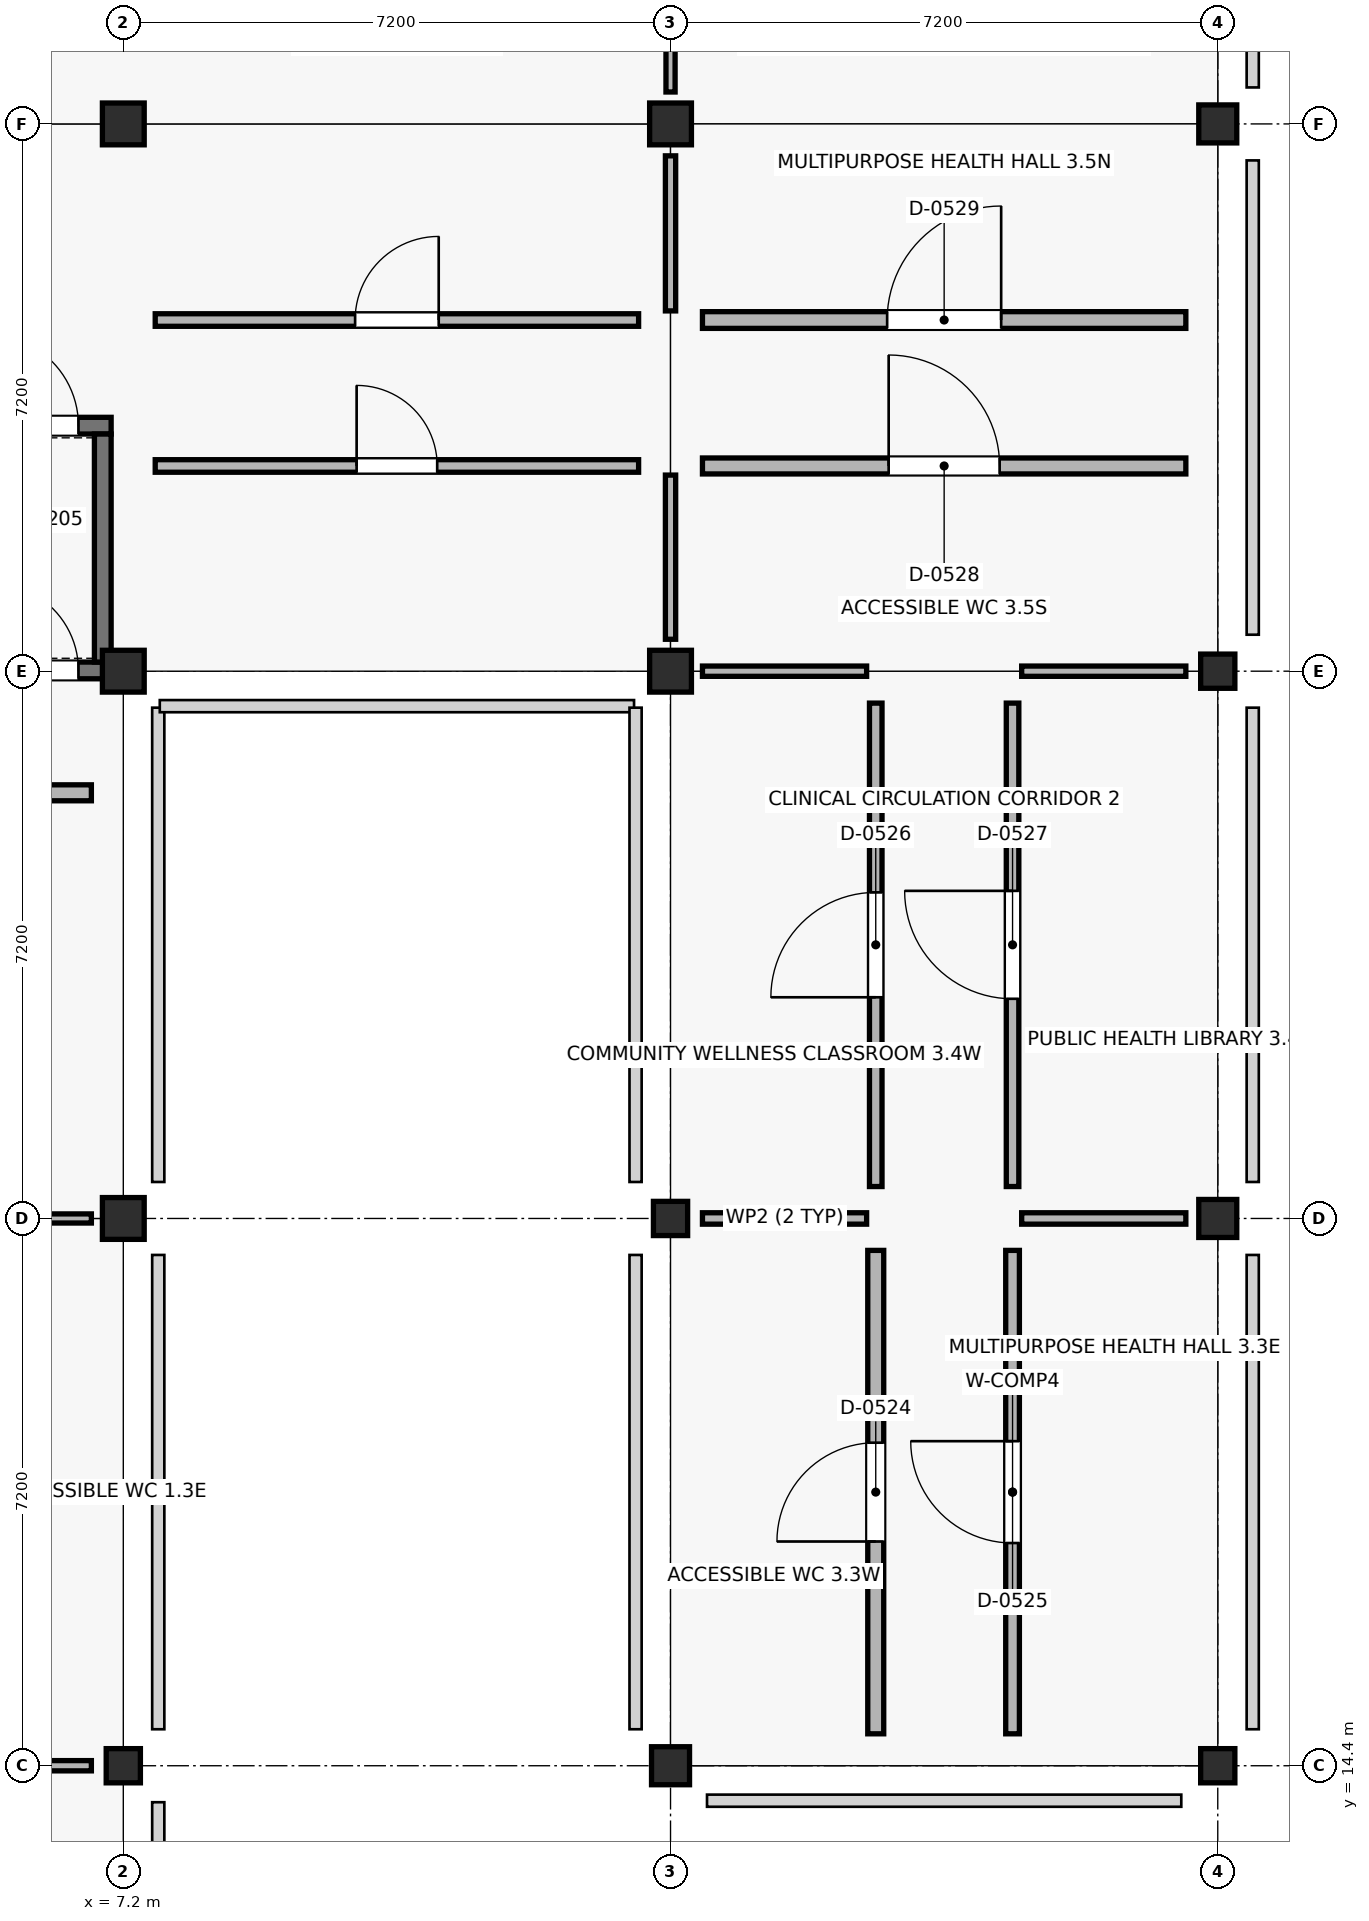
"""IFC4 building model, lengths in metres.
Left out: names, types, materials, properties, quantities, classifications, styles, units other than length and angle.
Written with IfcOpenShell. Run it as: python <this file> out.ifc"""

import sys

from ifc_helpers import new_model, si_unit, direction, frame, frame_2d, origin, origin_2d, place, context, subcontext, project, spatial, rectangle, extrude, element, fill, save


model = new_model("IFC4")
c1 = context("Model", 3, precision=1e-05, world=origin(), true_north=direction((0.0, 1.0)))
c2 = subcontext(c1, "Body", "Model", "MODEL_VIEW")
j1 = project(units=[si_unit("LENGTHUNIT", "METRE"), si_unit("PLANEANGLEUNIT", "RADIAN")], contexts=[c1])
p1 = place(None, origin())
s1 = spatial("IfcSite", under=j1, at=p1, CompositionType="ELEMENT")
p2 = place(p1, origin())
s2 = spatial("IfcBuilding", under=s1, at=p2, CompositionType="ELEMENT")
p3 = place(p2, frame((0.0, 0.0, 9.0)))
s3 = spatial("IfcBuildingStorey", under=s2, at=p3, CompositionType="ELEMENT", Elevation=9.0)
p4 = place(p3, frame((7.2, 14.4, 0.0), z_axis=(0.0, 0.0, 1.0), x_axis=(1.0, 0.0, 0.0)))
e1 = element("IfcColumn", 1, at=p4, inside=s3, PredefinedType="COLUMN", context=c2, shape_type="SweptSolid", body=[
    extrude(rectangle(XDim=0.45, YDim=0.45, at=origin_2d()), origin(), (0.0, 0.0, 1.0), 4.28),
])
for number, where, z_axis, x_axis in (
    (2, (7.2, 21.6, 0.0), (0.0, 0.0, 1.0), (1.0, 0.0, 0.0)),
    (3, (7.2, 28.8, 0.0), (0.0, 0.0, 1.0), (1.0, 0.0, 0.0)),
    (4, (7.2, 36.0, 0.0), (0.0, 0.0, 1.0), (1.0, 0.0, 0.0)),
):
    element("IfcColumn", number, at=place(p3, frame(where, z_axis=z_axis, x_axis=x_axis)), inside=s3, PredefinedType="COLUMN", context=c2, shape_type="SweptSolid", body=[
        extrude(rectangle(XDim=0.55, YDim=0.55, at=origin_2d()), origin(), (0.0, 0.0, 1.0), 4.5),
    ])
p5 = place(p3, frame((14.4, 14.4, 0.0), z_axis=(0.0, 0.0, 1.0), x_axis=(1.0, 0.0, 0.0)))
e5 = element("IfcColumn", 5, at=p5, inside=s3, PredefinedType="COLUMN", context=c2, shape_type="SweptSolid", body=[
    extrude(rectangle(XDim=0.5, YDim=0.5, at=origin_2d()), origin(), (0.0, 0.0, 1.0), 4.28),
])
p6 = place(p3, frame((14.4, 21.6, 0.0), z_axis=(0.0, 0.0, 1.0), x_axis=(1.0, 0.0, 0.0)))
e6 = element("IfcColumn", 6, at=p6, inside=s3, PredefinedType="COLUMN", context=c2, shape_type="SweptSolid", body=[
    extrude(rectangle(XDim=0.45, YDim=0.45, at=origin_2d()), origin(), (0.0, 0.0, 1.0), 4.28),
])
for number, where, z_axis, x_axis in (
    (7, (14.4, 28.8, 0.0), (0.0, 0.0, 1.0), (1.0, 0.0, 0.0)),
    (8, (14.4, 36.0, 0.0), (0.0, 0.0, 1.0), (1.0, 0.0, 0.0)),
):
    element("IfcColumn", number, at=place(p3, frame(where, z_axis=z_axis, x_axis=x_axis)), inside=s3, PredefinedType="COLUMN", context=c2, shape_type="SweptSolid", body=[
        extrude(rectangle(XDim=0.55, YDim=0.55, at=origin_2d()), origin(), (0.0, 0.0, 1.0), 4.5),
    ])
p7 = place(p3, frame((21.6, 14.4, 0.0), z_axis=(0.0, 0.0, 1.0), x_axis=(1.0, 0.0, 0.0)))
e9 = element("IfcColumn", 9, at=p7, inside=s3, PredefinedType="COLUMN", context=c2, shape_type="SweptSolid", body=[
    extrude(rectangle(XDim=0.45, YDim=0.45, at=origin_2d()), origin(), (0.0, 0.0, 1.0), 4.28),
])
p8 = place(p3, frame((21.6, 21.6, 0.0), z_axis=(0.0, 0.0, 1.0), x_axis=(1.0, 0.0, 0.0)))
e10 = element("IfcColumn", 10, at=p8, inside=s3, PredefinedType="COLUMN", context=c2, shape_type="SweptSolid", body=[
    extrude(rectangle(XDim=0.5, YDim=0.5, at=origin_2d()), origin(), (0.0, 0.0, 1.0), 4.28),
])
p9 = place(p3, frame((21.6, 28.8, 0.0), z_axis=(0.0, 0.0, 1.0), x_axis=(1.0, 0.0, 0.0)))
e11 = element("IfcColumn", 11, at=p9, inside=s3, PredefinedType="COLUMN", context=c2, shape_type="SweptSolid", body=[
    extrude(rectangle(XDim=0.45, YDim=0.45, at=origin_2d()), origin(), (0.0, 0.0, 1.0), 4.28),
])
p10 = place(p3, frame((21.6, 36.0, 0.0), z_axis=(0.0, 0.0, 1.0), x_axis=(1.0, 0.0, 0.0)))
e12 = element("IfcColumn", 12, at=p10, inside=s3, PredefinedType="COLUMN", context=c2, shape_type="SweptSolid", body=[
    extrude(rectangle(XDim=0.5, YDim=0.5, at=origin_2d()), origin(), (0.0, 0.0, 1.0), 4.28),
])
p11 = place(p3, frame((0.16, 28.81, 0.0), z_axis=(0.0, 0.0, 1.0), x_axis=(1.0, 0.0, 0.0)))
e13 = element("IfcWall", 13, at=p11, inside=s3, PredefinedType="SHEAR", context=c2, shape_type="SweptSolid", body=[
    extrude(rectangle(XDim=6.88, YDim=0.22, at=frame_2d((3.44, 0.0))), origin(), (0.0, 0.0, 1.0), 4.24),
])
p12 = place(p11, frame((5.3, 0.0, 0.0)))
e14 = element("IfcOpeningElement", 14, at=p12, cuts=e13, PredefinedType="OPENING", context=c2, shape_type="SweptSolid", body=[
    extrude(rectangle(XDim=1.15, YDim=2.15, at=frame_2d((0.575, 1.075))), frame((0.0, 0.12, 0.0), z_axis=(0.0, -1.0, 0.0), x_axis=(1.0, 0.0, 0.0)), (0.0, 0.0, 1.0), 0.24),
])
p13 = place(p3, frame((0.16, 32.03, 0.0), z_axis=(0.0, 0.0, 1.0), x_axis=(1.0, 0.0, 0.0)))
e15 = element("IfcWall", 15, at=p13, inside=s3, PredefinedType="SHEAR", context=c2, shape_type="SweptSolid", body=[
    extrude(rectangle(XDim=6.88, YDim=0.22, at=frame_2d((3.44, 0.0))), origin(), (0.0, 0.0, 1.0), 4.24),
])
p14 = place(p13, frame((5.25, 0.0, 0.0)))
e16 = element("IfcOpeningElement", 16, at=p14, cuts=e15, PredefinedType="OPENING", context=c2, shape_type="SweptSolid", body=[
    extrude(rectangle(XDim=1.2, YDim=2.15, at=frame_2d((0.6, 1.075))), frame((0.0, 0.12, 0.0), z_axis=(0.0, -1.0, 0.0), x_axis=(1.0, 0.0, 0.0)), (0.0, 0.0, 1.0), 0.24),
])
p15 = place(p3, frame((6.93, 28.92, 0.0), z_axis=(0.0, 0.0, 1.0), x_axis=(0.0, 1.0, 0.0)))
e17 = element("IfcWall", 17, at=p15, inside=s3, PredefinedType="SHEAR", context=c2, shape_type="SweptSolid", body=[
    extrude(rectangle(XDim=3.0, YDim=0.22, at=frame_2d((1.5, 0.0))), origin(), (0.0, 0.0, 1.0), 4.24),
])
p16 = place(p3, frame((4.62, 14.4, 0.0), z_axis=(0.0, 0.0, 1.0), x_axis=(1.0, 0.0, 0.0)))
e18 = element("IfcWall", 18, at=p16, inside=s3, PredefinedType="PARTITIONING", context=c2, shape_type="SweptSolid", body=[
    extrude(rectangle(XDim=2.16, YDim=0.135, at=frame_2d((1.08, 0.0))), origin(), (0.0, 0.0, 1.0), 3.38),
])
p17 = place(p3, frame((4.62, 21.6, 0.0), z_axis=(0.0, 0.0, 1.0), x_axis=(1.0, 0.0, 0.0)))
e19 = element("IfcWall", 19, at=p17, inside=s3, PredefinedType="PARTITIONING", context=c2, shape_type="SweptSolid", body=[
    extrude(rectangle(XDim=2.16, YDim=0.12, at=frame_2d((1.08, 0.0))), origin(), (0.0, 0.0, 1.0), 3.38),
])
p18 = place(p3, frame((4.5, 27.2, 0.0), z_axis=(0.0, 0.0, 1.0), x_axis=(1.0, 0.0, 0.0)))
e20 = element("IfcWall", 20, at=p18, inside=s3, PredefinedType="PLUMBINGWALL", context=c2, shape_type="SweptSolid", body=[
    extrude(rectangle(XDim=2.28, YDim=0.21, at=frame_2d((1.14, 0.0))), origin(), (0.0, 0.0, 1.0), 3.38),
])
p19 = place(p3, frame((7.62, 31.5, 0.0), z_axis=(0.0, 0.0, 1.0), x_axis=(1.0, 0.0, 0.0)))
e21 = element("IfcWall", 21, at=p19, inside=s3, PredefinedType="PARTITIONING", context=c2, shape_type="SweptSolid", body=[
    extrude(rectangle(XDim=6.36, YDim=0.165, at=frame_2d((3.18, 0.0))), origin(), (0.0, 0.0, 1.0), 3.38),
])
p20 = place(p19, frame((2.65, 0.0, 0.0)))
e22 = element("IfcOpeningElement", 22, at=p20, cuts=e21, PredefinedType="OPENING", context=c2, shape_type="SweptSolid", body=[
    extrude(rectangle(XDim=1.06, YDim=2.09, at=frame_2d((0.53, 1.045))), frame((0.0, 0.093, 0.0), z_axis=(0.0, -1.0, 0.0), x_axis=(1.0, 0.0, 0.0)), (0.0, 0.0, 1.0), 0.185),
])
p21 = place(p3, frame((14.4, 29.22, 0.0), z_axis=(0.0, 0.0, 1.0), x_axis=(0.0, 1.0, 0.0)))
e23 = element("IfcWall", 23, at=p21, inside=s3, PredefinedType="PARTITIONING", context=c2, shape_type="SweptSolid", body=[
    extrude(rectangle(XDim=2.16, YDim=0.135, at=frame_2d((1.08, 0.0))), origin(), (0.0, 0.0, 1.0), 3.38),
])
p22 = place(p3, frame((7.62, 33.42, 0.0), z_axis=(0.0, 0.0, 1.0), x_axis=(1.0, 0.0, 0.0)))
e24 = element("IfcWall", 24, at=p22, inside=s3, PredefinedType="PARTITIONING", context=c2, shape_type="SweptSolid", body=[
    extrude(rectangle(XDim=6.36, YDim=0.165, at=frame_2d((3.18, 0.0))), origin(), (0.0, 0.0, 1.0), 3.38),
])
p23 = place(p22, frame((2.63, 0.0, 0.0)))
e25 = element("IfcOpeningElement", 25, at=p23, cuts=e24, PredefinedType="OPENING", context=c2, shape_type="SweptSolid", body=[
    extrude(rectangle(XDim=1.1, YDim=2.09, at=frame_2d((0.55, 1.045))), frame((0.0, 0.093, 0.0), z_axis=(0.0, -1.0, 0.0), x_axis=(1.0, 0.0, 0.0)), (0.0, 0.0, 1.0), 0.185),
])
p24 = place(p3, frame((14.4, 33.54, 0.0), z_axis=(0.0, 0.0, 1.0), x_axis=(0.0, 1.0, 0.0)))
e26 = element("IfcWall", 26, at=p24, inside=s3, PredefinedType="PARTITIONING", context=c2, shape_type="SweptSolid", body=[
    extrude(rectangle(XDim=2.04, YDim=0.135, at=frame_2d((1.02, 0.0))), origin(), (0.0, 0.0, 1.0), 3.38),
])
p25 = place(p3, frame((14.4, 36.42, 0.0), z_axis=(0.0, 0.0, 1.0), x_axis=(0.0, 1.0, 0.0)))
e27 = element("IfcWall", 27, at=p25, inside=s3, PredefinedType="PARTITIONING", context=c2, shape_type="SweptSolid", body=[
    extrude(rectangle(XDim=2.16, YDim=0.12, at=frame_2d((1.08, 0.0))), origin(), (0.0, 0.0, 1.0), 3.38),
])
p26 = place(p3, frame((17.1, 14.82, 0.0), z_axis=(0.0, 0.0, 1.0), x_axis=(0.0, 1.0, 0.0)))
e28 = element("IfcWall", 28, at=p26, inside=s3, PredefinedType="PLUMBINGWALL", context=c2, shape_type="SweptSolid", body=[
    extrude(rectangle(XDim=6.36, YDim=0.21, at=frame_2d((3.18, 0.0))), origin(), (0.0, 0.0, 1.0), 3.38),
])
p27 = place(p26, frame((2.53, 0.0, 0.0)))
e29 = element("IfcOpeningElement", 29, at=p27, cuts=e28, PredefinedType="OPENING", context=c2, shape_type="SweptSolid", body=[
    extrude(rectangle(XDim=1.3, YDim=2.09, at=frame_2d((0.65, 1.045))), frame((0.0, 0.115, 0.0), z_axis=(0.0, -1.0, 0.0), x_axis=(1.0, 0.0, 0.0)), (0.0, 0.0, 1.0), 0.23),
])
p28 = place(p3, frame((14.82, 21.6, 0.0), z_axis=(0.0, 0.0, 1.0), x_axis=(1.0, 0.0, 0.0)))
e30 = element("IfcWall", 30, at=p28, inside=s3, PredefinedType="PARTITIONING", context=c2, shape_type="SweptSolid", body=[
    extrude(rectangle(XDim=2.16, YDim=0.15, at=frame_2d((1.08, 0.0))), origin(), (0.0, 0.0, 1.0), 3.38),
])
p29 = place(p3, frame((18.9, 14.82, 0.0), z_axis=(0.0, 0.0, 1.0), x_axis=(0.0, 1.0, 0.0)))
e31 = element("IfcWall", 31, at=p29, inside=s3, PredefinedType="PARTITIONING", context=c2, shape_type="SweptSolid", body=[
    extrude(rectangle(XDim=6.36, YDim=0.18, at=frame_2d((3.18, 0.0))), origin(), (0.0, 0.0, 1.0), 3.38),
])
p30 = place(p29, frame((2.51, 0.0, 0.0)))
e32 = element("IfcOpeningElement", 32, at=p30, cuts=e31, PredefinedType="OPENING", context=c2, shape_type="SweptSolid", body=[
    extrude(rectangle(XDim=1.34, YDim=2.09, at=frame_2d((0.67, 1.045))), frame((0.0, 0.1, 0.0), z_axis=(0.0, -1.0, 0.0), x_axis=(1.0, 0.0, 0.0)), (0.0, 0.0, 1.0), 0.2),
])
p31 = place(p3, frame((19.02, 21.6, 0.0), z_axis=(0.0, 0.0, 1.0), x_axis=(1.0, 0.0, 0.0)))
e33 = element("IfcWall", 33, at=p31, inside=s3, PredefinedType="PARTITIONING", context=c2, shape_type="SweptSolid", body=[
    extrude(rectangle(XDim=2.16, YDim=0.15, at=frame_2d((1.08, 0.0))), origin(), (0.0, 0.0, 1.0), 3.38),
])
p32 = place(p3, frame((17.1, 22.02, 0.0), z_axis=(0.0, 0.0, 1.0), x_axis=(0.0, 1.0, 0.0)))
e34 = element("IfcWall", 34, at=p32, inside=s3, PredefinedType="PARTITIONING", context=c2, shape_type="SweptSolid", body=[
    extrude(rectangle(XDim=6.36, YDim=0.165, at=frame_2d((3.18, 0.0))), origin(), (0.0, 0.0, 1.0), 3.38),
])
p33 = place(p32, frame((2.49, 0.0, 0.0)))
e35 = element("IfcOpeningElement", 35, at=p33, cuts=e34, PredefinedType="OPENING", context=c2, shape_type="SweptSolid", body=[
    extrude(rectangle(XDim=1.38, YDim=2.09, at=frame_2d((0.69, 1.045))), frame((0.0, 0.093, 0.0), z_axis=(0.0, -1.0, 0.0), x_axis=(1.0, 0.0, 0.0)), (0.0, 0.0, 1.0), 0.185),
])
p34 = place(p3, frame((14.82, 28.8, 0.0), z_axis=(0.0, 0.0, 1.0), x_axis=(1.0, 0.0, 0.0)))
e36 = element("IfcWall", 36, at=p34, inside=s3, PredefinedType="PARTITIONING", context=c2, shape_type="SweptSolid", body=[
    extrude(rectangle(XDim=2.16, YDim=0.135, at=frame_2d((1.08, 0.0))), origin(), (0.0, 0.0, 1.0), 3.38),
])
p35 = place(p3, frame((18.9, 22.02, 0.0), z_axis=(0.0, 0.0, 1.0), x_axis=(0.0, 1.0, 0.0)))
e37 = element("IfcWall", 37, at=p35, inside=s3, PredefinedType="PARTITIONING", context=c2, shape_type="SweptSolid", body=[
    extrude(rectangle(XDim=6.36, YDim=0.165, at=frame_2d((3.18, 0.0))), origin(), (0.0, 0.0, 1.0), 3.38),
])
p36 = place(p35, frame((2.47, 0.0, 0.0)))
e38 = element("IfcOpeningElement", 38, at=p36, cuts=e37, PredefinedType="OPENING", context=c2, shape_type="SweptSolid", body=[
    extrude(rectangle(XDim=1.42, YDim=2.09, at=frame_2d((0.71, 1.045))), frame((0.0, 0.093, 0.0), z_axis=(0.0, -1.0, 0.0), x_axis=(1.0, 0.0, 0.0)), (0.0, 0.0, 1.0), 0.185),
])
p37 = place(p3, frame((19.02, 28.8, 0.0), z_axis=(0.0, 0.0, 1.0), x_axis=(1.0, 0.0, 0.0)))
e39 = element("IfcWall", 39, at=p37, inside=s3, PredefinedType="PARTITIONING", context=c2, shape_type="SweptSolid", body=[
    extrude(rectangle(XDim=2.16, YDim=0.135, at=frame_2d((1.08, 0.0))), origin(), (0.0, 0.0, 1.0), 3.38),
])
p38 = place(p3, frame((14.82, 31.5, 0.0), z_axis=(0.0, 0.0, 1.0), x_axis=(1.0, 0.0, 0.0)))
e40 = element("IfcWall", 40, at=p38, inside=s3, PredefinedType="PLUMBINGWALL", context=c2, shape_type="SweptSolid", body=[
    extrude(rectangle(XDim=6.36, YDim=0.21, at=frame_2d((3.18, 0.0))), origin(), (0.0, 0.0, 1.0), 3.38),
])
p39 = place(p38, frame((2.45, 0.0, 0.0)))
e41 = element("IfcOpeningElement", 41, at=p39, cuts=e40, PredefinedType="OPENING", context=c2, shape_type="SweptSolid", body=[
    extrude(rectangle(XDim=1.46, YDim=2.09, at=frame_2d((0.73, 1.045))), frame((0.0, 0.115, 0.0), z_axis=(0.0, -1.0, 0.0), x_axis=(1.0, 0.0, 0.0)), (0.0, 0.0, 1.0), 0.23),
])
p40 = place(p3, frame((14.82, 33.42, 0.0), z_axis=(0.0, 0.0, 1.0), x_axis=(1.0, 0.0, 0.0)))
e42 = element("IfcWall", 42, at=p40, inside=s3, PredefinedType="SOLIDWALL", context=c2, shape_type="SweptSolid", body=[
    extrude(rectangle(XDim=6.36, YDim=0.22, at=frame_2d((3.18, 0.0))), origin(), (0.0, 0.0, 1.0), 3.38),
])
p41 = place(p40, frame((2.43, 0.0, 0.0)))
e43 = element("IfcOpeningElement", 43, at=p41, cuts=e42, PredefinedType="OPENING", context=c2, shape_type="SweptSolid", body=[
    extrude(rectangle(XDim=1.5, YDim=2.09, at=frame_2d((0.75, 1.045))), frame((0.0, 0.12, 0.0), z_axis=(0.0, -1.0, 0.0), x_axis=(1.0, 0.0, 0.0)), (0.0, 0.0, 1.0), 0.24),
])
p42 = place(p14, origin())
e44 = element("IfcDoor", 44, at=p42, inside=s3, OperationType="SINGLE_SWING_LEFT", PredefinedType="DOOR", context=c2, shape_type="SweptSolid", body=[
    extrude(rectangle(XDim=1.2, YDim=2.15, at=frame_2d((0.6, 1.075))), frame((0.0, 0.025, 0.0), z_axis=(0.0, -1.0, 0.0), x_axis=(1.0, 0.0, 0.0)), (0.0, 0.0, 1.0), 0.05),
])
fill(e16, e44)
p43 = place(p12, origin())
e45 = element("IfcDoor", 45, at=p43, inside=s3, OperationType="SINGLE_SWING_LEFT", PredefinedType="DOOR", context=c2, shape_type="SweptSolid", body=[
    extrude(rectangle(XDim=1.15, YDim=2.15, at=frame_2d((0.575, 1.075))), frame((0.0, 0.025, 0.0), z_axis=(0.0, -1.0, 0.0), x_axis=(1.0, 0.0, 0.0)), (0.0, 0.0, 1.0), 0.05),
])
fill(e14, e45)
p44 = place(p20, origin())
e46 = element("IfcDoor", 46, at=p44, inside=s3, OperationType="SINGLE_SWING_LEFT", PredefinedType="DOOR", context=c2, shape_type="SweptSolid", body=[
    extrude(rectangle(XDim=1.06, YDim=2.09, at=frame_2d((0.53, 1.045))), frame((0.0, 0.025, 0.0), z_axis=(0.0, -1.0, 0.0), x_axis=(1.0, 0.0, 0.0)), (0.0, 0.0, 1.0), 0.05),
])
fill(e22, e46)
p45 = place(p23, origin())
e47 = element("IfcDoor", 47, at=p45, inside=s3, OperationType="SINGLE_SWING_RIGHT", PredefinedType="DOOR", context=c2, shape_type="SweptSolid", body=[
    extrude(rectangle(XDim=1.1, YDim=2.09, at=frame_2d((0.55, 1.045))), frame((0.0, 0.025, 0.0), z_axis=(0.0, -1.0, 0.0), x_axis=(1.0, 0.0, 0.0)), (0.0, 0.0, 1.0), 0.05),
])
fill(e25, e47)
p46 = place(p27, origin())
e48 = element("IfcDoor", 48, at=p46, inside=s3, OperationType="SINGLE_SWING_LEFT", PredefinedType="DOOR", context=c2, shape_type="SweptSolid", body=[
    extrude(rectangle(XDim=1.3, YDim=2.09, at=frame_2d((0.65, 1.045))), frame((0.0, 0.025, 0.0), z_axis=(0.0, -1.0, 0.0), x_axis=(1.0, 0.0, 0.0)), (0.0, 0.0, 1.0), 0.05),
])
fill(e29, e48)
p47 = place(p30, origin())
e49 = element("IfcDoor", 49, at=p47, inside=s3, OperationType="SINGLE_SWING_RIGHT", PredefinedType="DOOR", context=c2, shape_type="SweptSolid", body=[
    extrude(rectangle(XDim=1.34, YDim=2.09, at=frame_2d((0.67, 1.045))), frame((0.0, 0.025, 0.0), z_axis=(0.0, -1.0, 0.0), x_axis=(1.0, 0.0, 0.0)), (0.0, 0.0, 1.0), 0.05),
])
fill(e32, e49)
p48 = place(p33, origin())
e50 = element("IfcDoor", 50, at=p48, inside=s3, OperationType="SINGLE_SWING_LEFT", PredefinedType="DOOR", context=c2, shape_type="SweptSolid", body=[
    extrude(rectangle(XDim=1.38, YDim=2.09, at=frame_2d((0.69, 1.045))), frame((0.0, 0.025, 0.0), z_axis=(0.0, -1.0, 0.0), x_axis=(1.0, 0.0, 0.0)), (0.0, 0.0, 1.0), 0.05),
])
fill(e35, e50)
p49 = place(p36, origin())
e51 = element("IfcDoor", 51, at=p49, inside=s3, OperationType="SINGLE_SWING_RIGHT", PredefinedType="DOOR", context=c2, shape_type="SweptSolid", body=[
    extrude(rectangle(XDim=1.42, YDim=2.09, at=frame_2d((0.71, 1.045))), frame((0.0, 0.025, 0.0), z_axis=(0.0, -1.0, 0.0), x_axis=(1.0, 0.0, 0.0)), (0.0, 0.0, 1.0), 0.05),
])
fill(e38, e51)
p50 = place(p39, origin())
e52 = element("IfcDoor", 52, at=p50, inside=s3, OperationType="SINGLE_SWING_LEFT", PredefinedType="DOOR", context=c2, shape_type="SweptSolid", body=[
    extrude(rectangle(XDim=1.46, YDim=2.09, at=frame_2d((0.73, 1.045))), frame((0.0, 0.025, 0.0), z_axis=(0.0, -1.0, 0.0), x_axis=(1.0, 0.0, 0.0)), (0.0, 0.0, 1.0), 0.05),
])
fill(e41, e52)
p51 = place(p41, origin())
e53 = element("IfcDoor", 53, at=p51, inside=s3, OperationType="SINGLE_SWING_RIGHT", PredefinedType="DOOR", context=c2, shape_type="SweptSolid", body=[
    extrude(rectangle(XDim=1.5, YDim=2.09, at=frame_2d((0.75, 1.045))), frame((0.0, 0.025, 0.0), z_axis=(0.0, -1.0, 0.0), x_axis=(1.0, 0.0, 0.0)), (0.0, 0.0, 1.0), 0.05),
])
fill(e43, e53)
save(model, sys.argv[1])
